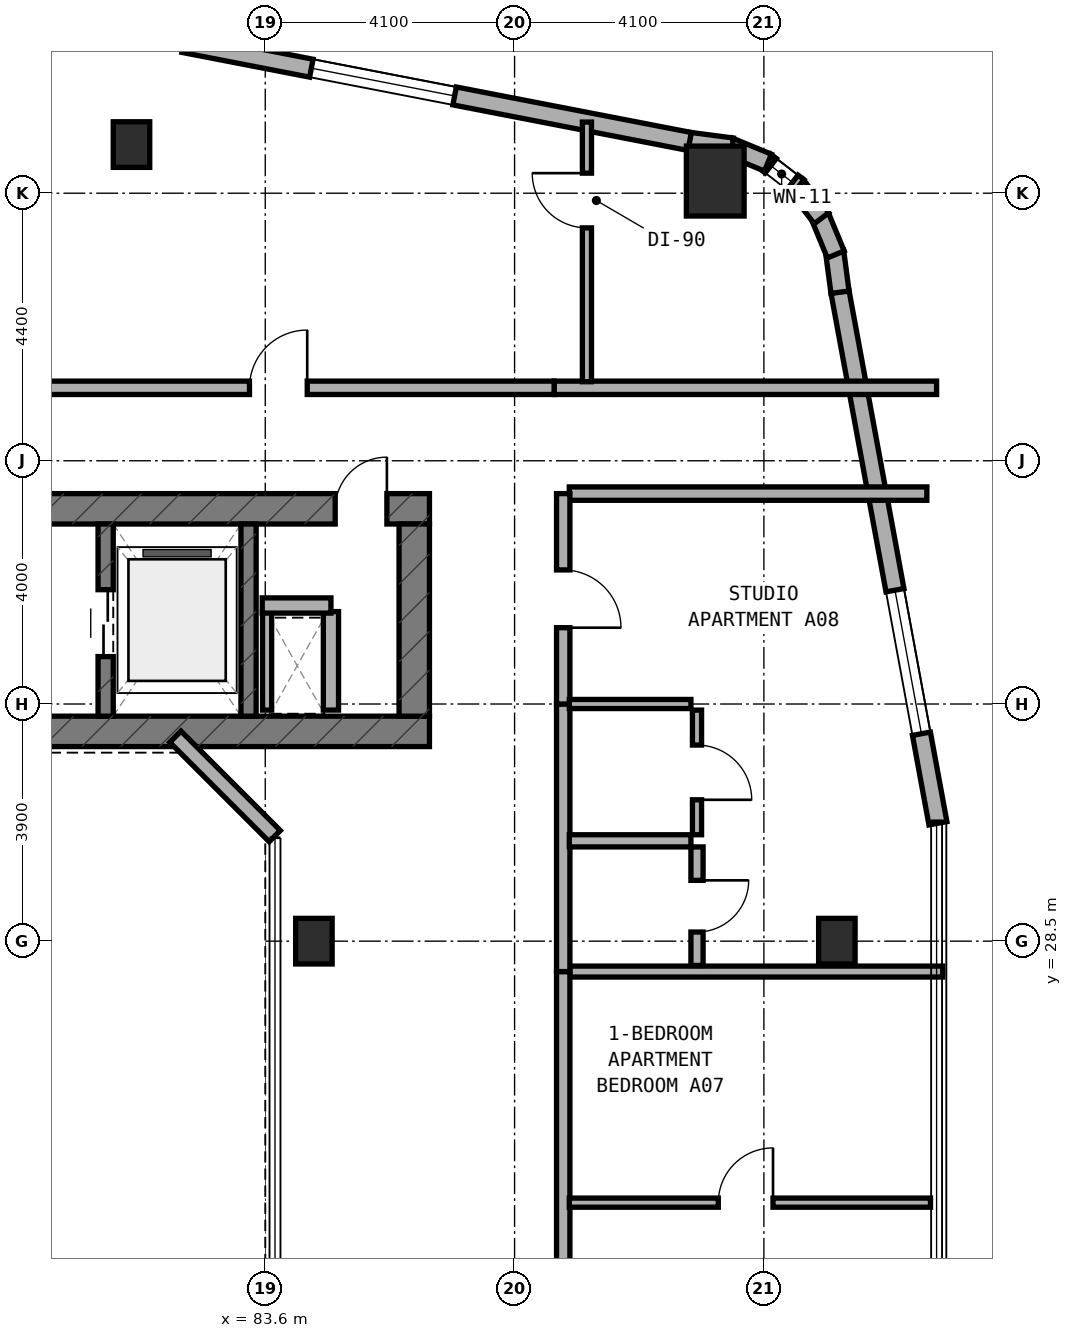
"""IFC4 building model, lengths in metres.
Left out: names, types, materials, properties, quantities, classifications, styles, units other than length and angle.
Written with IfcOpenShell. Run it as: python <this file> out.ifc"""

import sys

from ifc_helpers import new_model, si_unit, direction, frame, frame_2d, origin, origin_2d, place, context, subcontext, project, spatial, rectangle, extrude, element, fill, save


model = new_model("IFC4")
c1 = context("Model", 3, precision=1e-05, world=origin(), true_north=direction((0.0, 1.0)))
c2 = subcontext(c1, "Body", "Model", "MODEL_VIEW")
j1 = project(units=[si_unit("LENGTHUNIT", "METRE"), si_unit("PLANEANGLEUNIT", "RADIAN")], contexts=[c1])
p1 = place(None, origin())
s1 = spatial("IfcSite", under=j1, at=p1, CompositionType="ELEMENT")
p2 = place(p1, origin())
s2 = spatial("IfcBuilding", under=s1, at=p2, CompositionType="ELEMENT")
p3 = place(p2, frame((0.0, 0.0, 83.5)))
s3 = spatial("IfcBuildingStorey", under=s2, at=p3, CompositionType="ELEMENT", Elevation=83.5)
p4 = place(p3, frame((67.9, 31.95, 0.0), z_axis=(0.0, 0.0, 1.0), x_axis=(1.0, 0.0, 0.0)))
e1 = element("IfcWall", 1, at=p4, inside=s3, PredefinedType="SHEAR", context=c2, shape_type="SweptSolid", body=[
    extrude(rectangle(XDim=18.4, YDim=0.5, at=frame_2d((9.2, 0.0))), origin(), (0.0, 0.0, 1.0), 3.5),
])
p5 = place(p3, frame((67.9, 35.61, 0.0), z_axis=(0.0, 0.0, 1.0), x_axis=(1.0, 0.0, 0.0)))
e2 = element("IfcWall", 2, at=p5, inside=s3, PredefinedType="SHEAR", context=c2, shape_type="SweptSolid", body=[
    extrude(rectangle(XDim=18.4, YDim=0.5, at=frame_2d((9.2, 0.0))), origin(), (0.0, 0.0, 1.0), 3.5),
])
p6 = place(p5, frame((9.25, 0.0, 0.0)))
e3 = element("IfcOpeningElement", 3, at=p6, cuts=e2, PredefinedType="OPENING", context=c2, shape_type="SweptSolid", body=[
    extrude(rectangle(XDim=1.2, YDim=2.15, at=frame_2d((0.6, 1.075))), frame((0.0, 0.26, 0.0), z_axis=(0.0, -1.0, 0.0), x_axis=(1.0, 0.0, 0.0)), (0.0, 0.0, 1.0), 0.52),
])
p7 = place(p5, frame((16.85, 0.0, 0.0)))
e4 = element("IfcOpeningElement", 4, at=p7, cuts=e2, PredefinedType="OPENING", context=c2, shape_type="SweptSolid", body=[
    extrude(rectangle(XDim=0.85, YDim=2.1, at=frame_2d((0.425, 1.05))), frame((0.0, 0.26, 0.0), z_axis=(0.0, -1.0, 0.0), x_axis=(1.0, 0.0, 0.0)), (0.0, 0.0, 1.0), 0.52),
])
p8 = place(p3, frame((86.05, 32.2, 0.0), z_axis=(0.0, 0.0, 1.0), x_axis=(0.0, 1.0, 0.0)))
e5 = element("IfcWall", 5, at=p8, inside=s3, PredefinedType="SHEAR", context=c2, shape_type="SweptSolid", body=[
    extrude(rectangle(XDim=3.16, YDim=0.5, at=frame_2d((1.58, 0.0))), origin(), (0.0, 0.0, 1.0), 3.5),
])
p9 = place(p3, frame((80.975, 32.2, 0.0), z_axis=(0.0, 0.0, 1.0), x_axis=(0.0, 1.0, 0.0)))
e6 = element("IfcWall", 6, at=p9, inside=s3, PredefinedType="STANDARD", context=c2, shape_type="SweptSolid", body=[
    extrude(rectangle(XDim=3.16, YDim=0.25, at=frame_2d((1.58, 0.0))), origin(), (0.0, 0.0, 1.0), 3.25),
])
p10 = place(p9, frame((0.98, 0.0, 0.0)))
e7 = element("IfcOpeningElement", 7, at=p10, cuts=e6, PredefinedType="OPENING", context=c2, shape_type="SweptSolid", body=[
    extrude(rectangle(XDim=1.1, YDim=2.15, at=frame_2d((0.55, 1.075))), frame((0.0, 0.135, 0.0), z_axis=(0.0, -1.0, 0.0), x_axis=(1.0, 0.0, 0.0)), (0.0, 0.0, 1.0), 0.27),
])
p11 = place(p3, frame((83.325, 32.2, 0.0), z_axis=(0.0, 0.0, 1.0), x_axis=(0.0, 1.0, 0.0)))
e8 = element("IfcWall", 8, at=p11, inside=s3, PredefinedType="STANDARD", context=c2, shape_type="SweptSolid", body=[
    extrude(rectangle(XDim=3.16, YDim=0.25, at=frame_2d((1.58, 0.0))), origin(), (0.0, 0.0, 1.0), 3.25),
])
for number, where, z_axis, x_axis in (
    (9, (81.4, 41.6, 0.0), (0.0, 0.0, 1.0), (1.0, 0.0, 0.0)),
    (10, (93.0, 28.5, 0.0), (0.0, 0.0, 1.0), (1.0, 0.0, 0.0)),
):
    element("IfcColumn", number, at=place(p3, frame(where, z_axis=z_axis, x_axis=x_axis)), inside=s3, PredefinedType="COLUMN", context=c2, shape_type="SweptSolid", body=[
        extrude(rectangle(XDim=0.6, YDim=0.75, at=origin_2d()), origin(), (0.0, 0.0, 1.0), 3.5),
    ])
p12 = place(p3, frame((91.0, 41.0, 0.0), z_axis=(0.0, 0.0, 1.0), x_axis=(1.0, 0.0, 0.0)))
e11 = element("IfcColumn", 11, at=p12, inside=s3, PredefinedType="COLUMN", context=c2, shape_type="SweptSolid", body=[
    extrude(rectangle(XDim=0.95, YDim=1.15, at=origin_2d()), origin(), (0.0, 0.0, 1.0), 3.5),
])
p13 = place(p3, frame((84.4, 28.5, 0.0), z_axis=(0.0, 0.0, 1.0), x_axis=(1.0, 0.0, 0.0)))
e12 = element("IfcColumn", 12, at=p13, inside=s3, PredefinedType="COLUMN", context=c2, shape_type="SweptSolid", body=[
    extrude(rectangle(XDim=0.6, YDim=0.75, at=origin_2d()), origin(), (0.0, 0.0, 1.0), 3.5),
])
p14 = place(p3, frame((94.662, 30.439, 0.0), z_axis=(0.0, 0.0, 1.0), x_axis=(-0.181241420611, 0.983438634311, 0.0)))
e13 = element("IfcWall", 13, at=p14, inside=s3, PredefinedType="STANDARD", context=c2, shape_type="SweptSolid", body=[
    extrude(rectangle(XDim=8.889, YDim=0.3, at=frame_2d((4.445, 0.0))), origin(), (0.0, 0.0, 1.0), 3.25),
])
p15 = place(p14, frame((1.497, 0.0, 0.8)))
e14 = element("IfcOpeningElement", 14, at=p15, cuts=e13, PredefinedType="OPENING", context=c2, shape_type="SweptSolid", body=[
    extrude(rectangle(XDim=2.4, YDim=1.6, at=frame_2d((1.2, 0.8))), frame((0.0, 0.16, 0.0), z_axis=(0.0, -1.0, 0.0), x_axis=(1.0, 0.0, 0.0)), (0.0, 0.0, 1.0), 0.32),
])
p16 = place(p3, frame((93.052, 39.172, 0.0), z_axis=(0.0, 0.0, 1.0), x_axis=(-0.131667498923, 0.991293937098, 0.0)))
e15 = element("IfcWall", 15, at=p16, inside=s3, PredefinedType="STANDARD", context=c2, shape_type="SweptSolid", body=[
    extrude(rectangle(XDim=0.677, YDim=0.3, at=frame_2d((0.338, 0.0))), origin(), (0.0, 0.0, 1.0), 3.25),
])
p17 = place(p3, frame((92.982, 39.793, 0.0), z_axis=(0.0, 0.0, 1.0), x_axis=(-0.381864727877, 0.92421822618, 0.0)))
e16 = element("IfcWall", 16, at=p17, inside=s3, PredefinedType="STANDARD", context=c2, shape_type="SweptSolid", body=[
    extrude(rectangle(XDim=0.694, YDim=0.3, at=frame_2d((0.347, 0.0))), origin(), (0.0, 0.0, 1.0), 3.25),
])
p18 = place(p3, frame((92.748, 40.389, 0.0), z_axis=(0.0, 0.0, 1.0), x_axis=(-0.609693758543, 0.792637067512, 0.0)))
e17 = element("IfcWall", 17, at=p18, inside=s3, PredefinedType="STANDARD", context=c2, shape_type="SweptSolid", body=[
    extrude(rectangle(XDim=0.694, YDim=0.3, at=frame_2d((0.347, 0.0))), origin(), (0.0, 0.0, 1.0), 3.25),
])
p19 = place(p3, frame((92.367, 40.904, 0.0), z_axis=(0.0, 0.0, 1.0), x_axis=(-0.792807092876, 0.609472651958, 0.0)))
e18 = element("IfcWall", 18, at=p19, inside=s3, PredefinedType="STANDARD", context=c2, shape_type="SweptSolid", body=[
    extrude(rectangle(XDim=0.694, YDim=0.3, at=frame_2d((0.347, 0.0))), origin(), (0.0, 0.0, 1.0), 3.25),
])
p20 = place(p19, frame((0.122, 0.0, 0.85)))
e19 = element("IfcOpeningElement", 19, at=p20, cuts=e18, PredefinedType="OPENING", context=c2, shape_type="SweptSolid", body=[
    extrude(rectangle(XDim=0.45, YDim=1.5, at=frame_2d((0.225, 0.75))), frame((0.0, 0.16, 0.0), z_axis=(0.0, -1.0, 0.0), x_axis=(1.0, 0.0, 0.0)), (0.0, 0.0, 1.0), 0.32),
])
p21 = place(p3, frame((91.866, 41.303, 0.0), z_axis=(0.0, 0.0, 1.0), x_axis=(-0.924042561464, 0.382289608286, 0.0)))
e20 = element("IfcWall", 20, at=p21, inside=s3, PredefinedType="STANDARD", context=c2, shape_type="SweptSolid", body=[
    extrude(rectangle(XDim=0.694, YDim=0.3, at=frame_2d((0.347, 0.0))), origin(), (0.0, 0.0, 1.0), 3.25),
])
p22 = place(p3, frame((91.278, 41.559, 0.0), z_axis=(0.0, 0.0, 1.0), x_axis=(-0.991433279471, 0.130614135366, 0.0)))
e21 = element("IfcWall", 21, at=p22, inside=s3, PredefinedType="STANDARD", context=c2, shape_type="SweptSolid", body=[
    extrude(rectangle(XDim=0.712, YDim=0.3, at=frame_2d((0.356, 0.0))), origin(), (0.0, 0.0, 1.0), 3.25),
])
p23 = place(p3, frame((90.579, 41.651, 0.0), z_axis=(0.0, 0.0, 1.0), x_axis=(-0.981750199588, 0.190175039396, 0.0)))
e22 = element("IfcWall", 22, at=p23, inside=s3, PredefinedType="STANDARD", context=c2, shape_type="SweptSolid", body=[
    extrude(rectangle(XDim=8.477, YDim=0.3, at=frame_2d((4.238, 0.0))), origin(), (0.0, 0.0, 1.0), 3.25),
])
p24 = place(p23, frame((3.937, 0.0, 0.8)))
e23 = element("IfcOpeningElement", 23, at=p24, cuts=e22, PredefinedType="OPENING", context=c2, shape_type="SweptSolid", body=[
    extrude(rectangle(XDim=2.4, YDim=1.6, at=frame_2d((1.2, 0.8))), frame((0.0, 0.16, 0.0), z_axis=(0.0, -1.0, 0.0), x_axis=(1.0, 0.0, 0.0)), (0.0, 0.0, 1.0), 0.32),
])
p25 = place(p3, frame((83.756, 30.228, 0.0), z_axis=(0.0, 0.0, 1.0), x_axis=(-0.707106781187, 0.707106781187, 0.0)))
e24 = element("IfcWall", 24, at=p25, inside=s3, PredefinedType="STANDARD", context=c2, shape_type="SweptSolid", body=[
    extrude(rectangle(XDim=2.311, YDim=0.26, at=frame_2d((1.155, 0.0))), origin(), (0.0, 0.0, 1.0), 3.25),
])
p26 = place(p3, frame((83.63, 32.3, 0.0), z_axis=(0.0, 0.0, 1.0), x_axis=(0.0, 1.0, 0.0)))
e25 = element("IfcWall", 25, at=p26, inside=s3, PredefinedType="PARTITIONING", context=c2, shape_type="SweptSolid", body=[
    extrude(rectangle(XDim=1.62, YDim=0.15, at=frame_2d((0.81, 0.0))), origin(), (0.0, 0.0, 1.0), 2.825),
])
p27 = place(p3, frame((84.68, 32.3, 0.0), z_axis=(0.0, 0.0, 1.0), x_axis=(0.0, 1.0, 0.0)))
e26 = element("IfcWall", 26, at=p27, inside=s3, PredefinedType="SOLIDWALL", context=c2, shape_type="SweptSolid", body=[
    extrude(rectangle(XDim=1.62, YDim=0.25, at=frame_2d((0.81, 0.0))), origin(), (0.0, 0.0, 1.0), 3.22),
])
p28 = place(p3, frame((83.55, 34.02, 0.0), z_axis=(0.0, 0.0, 1.0), x_axis=(1.0, 0.0, 0.0)))
e27 = element("IfcWall", 27, at=p28, inside=s3, PredefinedType="SOLIDWALL", context=c2, shape_type="SweptSolid", body=[
    extrude(rectangle(XDim=1.13, YDim=0.25, at=frame_2d((0.565, 0.0))), origin(), (0.0, 0.0, 1.0), 3.22),
])
p29 = place(p3, frame((88.35, 37.6, 0.0), z_axis=(0.0, 0.0, 1.0), x_axis=(1.0, 0.0, 0.0)))
e28 = element("IfcWall", 28, at=p29, inside=s3, PredefinedType="SOLIDWALL", context=c2, shape_type="SweptSolid", body=[
    extrude(rectangle(XDim=6.29, YDim=0.22, at=frame_2d((3.145, 0.0))), origin(), (0.0, 0.0, 1.0), 2.945),
])
p30 = place(p3, frame((79.28, 37.6, 0.0), z_axis=(0.0, 0.0, 1.0), x_axis=(1.0, 0.0, 0.0)))
e29 = element("IfcWall", 29, at=p30, inside=s3, PredefinedType="SOLIDWALL", context=c2, shape_type="SweptSolid", body=[
    extrude(rectangle(XDim=9.07, YDim=0.22, at=frame_2d((4.535, 0.0))), origin(), (0.0, 0.0, 1.0), 2.825),
])
p31 = place(p30, frame((4.06, 0.0, 0.0)))
e30 = element("IfcOpeningElement", 30, at=p31, cuts=e29, PredefinedType="OPENING", context=c2, shape_type="SweptSolid", body=[
    extrude(rectangle(XDim=0.95, YDim=2.1, at=frame_2d((0.475, 1.05))), frame((0.0, 0.12, 0.0), z_axis=(0.0, -1.0, 0.0), x_axis=(1.0, 0.0, 0.0)), (0.0, 0.0, 1.0), 0.24),
])
p32 = place(p3, frame((88.89, 37.7, 0.0), z_axis=(0.0, 0.0, 1.0), x_axis=(0.0, 1.0, 0.0)))
e31 = element("IfcWall", 31, at=p32, inside=s3, PredefinedType="PARTITIONING", context=c2, shape_type="SweptSolid", body=[
    extrude(rectangle(XDim=4.27, YDim=0.15, at=frame_2d((2.135, 0.0))), origin(), (0.0, 0.0, 1.0), 2.945),
])
p33 = place(p32, frame((2.53, 0.0, 0.0)))
e32 = element("IfcOpeningElement", 32, at=p33, cuts=e31, PredefinedType="OPENING", context=c2, shape_type="SweptSolid", body=[
    extrude(rectangle(XDim=0.9, YDim=2.1, at=frame_2d((0.45, 1.05))), frame((0.0, 0.085, 0.0), z_axis=(0.0, -1.0, 0.0), x_axis=(1.0, 0.0, 0.0)), (0.0, 0.0, 1.0), 0.17),
])
p34 = place(p3, frame((88.6, 35.86, 0.0), z_axis=(0.0, 0.0, 1.0), x_axis=(1.0, 0.0, 0.0)))
e33 = element("IfcWall", 33, at=p34, inside=s3, PredefinedType="SOLIDWALL", context=c2, shape_type="SweptSolid", body=[
    extrude(rectangle(XDim=5.88, YDim=0.22, at=frame_2d((2.94, 0.0))), origin(), (0.0, 0.0, 1.0), 2.945),
])
p35 = place(p3, frame((88.5, 28.0, 0.0), z_axis=(0.0, 0.0, 1.0), x_axis=(1.0, 0.0, 0.0)))
e34 = element("IfcWall", 34, at=p35, inside=s3, PredefinedType="SOLIDWALL", context=c2, shape_type="SweptSolid", body=[
    extrude(rectangle(XDim=6.24, YDim=0.18, at=frame_2d((3.12, 0.0))), origin(), (0.0, 0.0, 1.0), 2.945),
])
p36 = place(p3, frame((88.5, 18.54, 0.0), z_axis=(0.0, 0.0, 1.0), x_axis=(0.0, 1.0, 0.0)))
e35 = element("IfcWall", 35, at=p36, inside=s3, PredefinedType="SOLIDWALL", context=c2, shape_type="SweptSolid", body=[
    extrude(rectangle(XDim=9.46, YDim=0.22, at=frame_2d((4.73, 0.0))), origin(), (0.0, 0.0, 1.0), 2.825),
])
p37 = place(p36, frame((2.355, 0.0, 0.0)))
e36 = element("IfcOpeningElement", 36, at=p37, cuts=e35, PredefinedType="OPENING", context=c2, shape_type="SweptSolid", body=[
    extrude(rectangle(XDim=0.95, YDim=2.1, at=frame_2d((0.475, 1.05))), frame((0.0, 0.12, 0.0), z_axis=(0.0, -1.0, 0.0), x_axis=(1.0, 0.0, 0.0)), (0.0, 0.0, 1.0), 0.24),
])
p38 = place(p3, frame((88.6, 24.2, 0.0), z_axis=(0.0, 0.0, 1.0), x_axis=(1.0, 0.0, 0.0)))
e37 = element("IfcWall", 37, at=p38, inside=s3, PredefinedType="PARTITIONING", context=c2, shape_type="SweptSolid", body=[
    extrude(rectangle(XDim=5.94, YDim=0.15, at=frame_2d((2.97, 0.0))), origin(), (0.0, 0.0, 1.0), 2.945),
])
p39 = place(p38, frame((2.45, 0.0, 0.0)))
e38 = element("IfcOpeningElement", 38, at=p39, cuts=e37, PredefinedType="OPENING", context=c2, shape_type="SweptSolid", body=[
    extrude(rectangle(XDim=0.9, YDim=2.1, at=frame_2d((0.45, 1.05))), frame((0.0, 0.085, 0.0), z_axis=(0.0, -1.0, 0.0), x_axis=(1.0, 0.0, 0.0)), (0.0, 0.0, 1.0), 0.17),
])
p40 = place(p3, frame((88.5, 28.0, 0.0), z_axis=(0.0, 0.0, 1.0), x_axis=(0.0, 1.0, 0.0)))
e39 = element("IfcWall", 39, at=p40, inside=s3, PredefinedType="SOLIDWALL", context=c2, shape_type="SweptSolid", body=[
    extrude(rectangle(XDim=4.4, YDim=0.22, at=frame_2d((2.2, 0.0))), origin(), (0.0, 0.0, 1.0), 2.825),
])
p41 = place(p3, frame((88.5, 32.4, 0.0), z_axis=(0.0, 0.0, 1.0), x_axis=(0.0, 1.0, 0.0)))
e40 = element("IfcWall", 40, at=p41, inside=s3, PredefinedType="SOLIDWALL", context=c2, shape_type="SweptSolid", body=[
    extrude(rectangle(XDim=3.46, YDim=0.22, at=frame_2d((1.73, 0.0))), origin(), (0.0, 0.0, 1.0), 3.22),
])
p42 = place(p41, frame((1.255, 0.0, 0.0)))
e41 = element("IfcOpeningElement", 41, at=p42, cuts=e40, PredefinedType="OPENING", context=c2, shape_type="SweptSolid", body=[
    extrude(rectangle(XDim=0.95, YDim=2.1, at=frame_2d((0.475, 1.05))), frame((0.0, 0.12, 0.0), z_axis=(0.0, -1.0, 0.0), x_axis=(1.0, 0.0, 0.0)), (0.0, 0.0, 1.0), 0.24),
])
p43 = place(p3, frame((88.6, 30.15, 0.0), z_axis=(0.0, 0.0, 1.0), x_axis=(1.0, 0.0, 0.0)))
e42 = element("IfcWall", 42, at=p43, inside=s3, PredefinedType="PLUMBINGWALL", context=c2, shape_type="SweptSolid", body=[
    extrude(rectangle(XDim=2.0, YDim=0.2, at=frame_2d((1.0, 0.0))), origin(), (0.0, 0.0, 1.0), 3.22),
])
p44 = place(p3, frame((88.6, 32.4, 0.0), z_axis=(0.0, 0.0, 1.0), x_axis=(1.0, 0.0, 0.0)))
e43 = element("IfcWall", 43, at=p44, inside=s3, PredefinedType="PARTITIONING", context=c2, shape_type="SweptSolid", body=[
    extrude(rectangle(XDim=2.0, YDim=0.15, at=frame_2d((1.0, 0.0))), origin(), (0.0, 0.0, 1.0), 3.22),
])
p45 = place(p3, frame((90.7, 28.1, 0.0), z_axis=(0.0, 0.0, 1.0), x_axis=(0.0, 1.0, 0.0)))
e44 = element("IfcWall", 44, at=p45, inside=s3, PredefinedType="PLUMBINGWALL", context=c2, shape_type="SweptSolid", body=[
    extrude(rectangle(XDim=1.95, YDim=0.2, at=frame_2d((0.975, 0.0))), origin(), (0.0, 0.0, 1.0), 2.825),
])
p46 = place(p45, frame((0.55, 0.0, 0.0)))
e45 = element("IfcOpeningElement", 45, at=p46, cuts=e44, PredefinedType="OPENING", context=c2, shape_type="SweptSolid", body=[
    extrude(rectangle(XDim=0.85, YDim=2.1, at=frame_2d((0.425, 1.05))), frame((0.0, 0.11, 0.0), z_axis=(0.0, -1.0, 0.0), x_axis=(1.0, 0.0, 0.0)), (0.0, 0.0, 1.0), 0.22),
])
p47 = place(p3, frame((90.7, 30.25, 0.0), z_axis=(0.0, 0.0, 1.0), x_axis=(0.0, 1.0, 0.0)))
e46 = element("IfcWall", 46, at=p47, inside=s3, PredefinedType="PARTITIONING", context=c2, shape_type="SweptSolid", body=[
    extrude(rectangle(XDim=2.05, YDim=0.15, at=frame_2d((1.025, 0.0))), origin(), (0.0, 0.0, 1.0), 3.22),
])
p48 = place(p47, frame((0.575, 0.0, 0.0)))
e47 = element("IfcOpeningElement", 47, at=p48, cuts=e46, PredefinedType="OPENING", context=c2, shape_type="SweptSolid", body=[
    extrude(rectangle(XDim=0.9, YDim=2.1, at=frame_2d((0.45, 1.05))), frame((0.0, 0.085, 0.0), z_axis=(0.0, -1.0, 0.0), x_axis=(1.0, 0.0, 0.0)), (0.0, 0.0, 1.0), 0.17),
])
p49 = place(p15, origin())
e48 = element("IfcWindow", 48, at=p49, inside=s3, PartitioningType="SINGLE_PANEL", PredefinedType="WINDOW", context=c2, shape_type="SweptSolid", body=[
    extrude(rectangle(XDim=2.4, YDim=1.6, at=frame_2d((1.2, 0.8))), frame((0.0, 0.03, 0.0), z_axis=(0.0, -1.0, 0.0), x_axis=(1.0, 0.0, 0.0)), (0.0, 0.0, 1.0), 0.06),
])
fill(e14, e48)
p50 = place(p24, origin())
e49 = element("IfcWindow", 49, at=p50, inside=s3, PartitioningType="SINGLE_PANEL", PredefinedType="WINDOW", context=c2, shape_type="SweptSolid", body=[
    extrude(rectangle(XDim=2.4, YDim=1.6, at=frame_2d((1.2, 0.8))), frame((0.0, 0.03, 0.0), z_axis=(0.0, -1.0, 0.0), x_axis=(1.0, 0.0, 0.0)), (0.0, 0.0, 1.0), 0.06),
])
fill(e23, e49)
p51 = place(p20, origin())
e50 = element("IfcWindow", 50, at=p51, inside=s3, PartitioningType="SINGLE_PANEL", PredefinedType="WINDOW", context=c2, shape_type="SweptSolid", body=[
    extrude(rectangle(XDim=0.45, YDim=1.5, at=frame_2d((0.225, 0.75))), frame((0.0, 0.03, 0.0), z_axis=(0.0, -1.0, 0.0), x_axis=(1.0, 0.0, 0.0)), (0.0, 0.0, 1.0), 0.06),
])
fill(e19, e50)
p52 = place(p10, origin())
e51 = element("IfcDoor", 51, at=p52, inside=s3, OperationType="DOUBLE_DOOR_SLIDING", PredefinedType="DOOR", context=c2, shape_type="SweptSolid", body=[
    extrude(rectangle(XDim=1.1, YDim=2.15, at=frame_2d((0.55, 1.075))), frame((0.0, 0.025, 0.0), z_axis=(0.0, -1.0, 0.0), x_axis=(1.0, 0.0, 0.0)), (0.0, 0.0, 1.0), 0.05),
])
fill(e7, e51)
p53 = place(p7, origin())
e52 = element("IfcDoor", 52, at=p53, inside=s3, OperationType="SINGLE_SWING_RIGHT", PredefinedType="DOOR", context=c2, shape_type="SweptSolid", body=[
    extrude(rectangle(XDim=0.85, YDim=2.1, at=frame_2d((0.425, 1.05))), frame((0.0, 0.025, 0.0), z_axis=(0.0, -1.0, 0.0), x_axis=(1.0, 0.0, 0.0)), (0.0, 0.0, 1.0), 0.05),
])
fill(e4, e52)
p54 = place(p31, origin())
e53 = element("IfcDoor", 53, at=p54, inside=s3, OperationType="SINGLE_SWING_RIGHT", PredefinedType="DOOR", context=c2, shape_type="SweptSolid", body=[
    extrude(rectangle(XDim=0.95, YDim=2.1, at=frame_2d((0.475, 1.05))), frame((0.0, 0.025, 0.0), z_axis=(0.0, -1.0, 0.0), x_axis=(1.0, 0.0, 0.0)), (0.0, 0.0, 1.0), 0.05),
])
fill(e30, e53)
p55 = place(p33, origin())
e54 = element("IfcDoor", 54, at=p55, inside=s3, OperationType="SINGLE_SWING_RIGHT", PredefinedType="DOOR", context=c2, shape_type="SweptSolid", body=[
    extrude(rectangle(XDim=0.9, YDim=2.1, at=frame_2d((0.45, 1.05))), frame((0.0, 0.025, 0.0), z_axis=(0.0, -1.0, 0.0), x_axis=(1.0, 0.0, 0.0)), (0.0, 0.0, 1.0), 0.05),
])
fill(e32, e54)
p56 = place(p39, origin())
e55 = element("IfcDoor", 55, at=p56, inside=s3, OperationType="SINGLE_SWING_RIGHT", PredefinedType="DOOR", context=c2, shape_type="SweptSolid", body=[
    extrude(rectangle(XDim=0.9, YDim=2.1, at=frame_2d((0.45, 1.05))), frame((0.0, 0.025, 0.0), z_axis=(0.0, -1.0, 0.0), x_axis=(1.0, 0.0, 0.0)), (0.0, 0.0, 1.0), 0.05),
])
fill(e38, e55)
p57 = place(p42, frame((0.95, 0.0, 0.0), z_axis=(0.0, 0.0, 1.0), x_axis=(-1.0, 0.0, 0.0)))
e56 = element("IfcDoor", 56, at=p57, inside=s3, OperationType="SINGLE_SWING_RIGHT", PredefinedType="DOOR", context=c2, shape_type="SweptSolid", body=[
    extrude(rectangle(XDim=0.95, YDim=2.1, at=frame_2d((0.475, 1.05))), frame((0.0, 0.025, 0.0), z_axis=(0.0, -1.0, 0.0), x_axis=(1.0, 0.0, 0.0)), (0.0, 0.0, 1.0), 0.05),
])
fill(e41, e56)
p58 = place(p46, frame((0.85, 0.0, 0.0), z_axis=(0.0, 0.0, 1.0), x_axis=(-1.0, 0.0, 0.0)))
e57 = element("IfcDoor", 57, at=p58, inside=s3, OperationType="SINGLE_SWING_LEFT", PredefinedType="DOOR", context=c2, shape_type="SweptSolid", body=[
    extrude(rectangle(XDim=0.85, YDim=2.1, at=frame_2d((0.425, 1.05))), frame((0.0, 0.025, 0.0), z_axis=(0.0, -1.0, 0.0), x_axis=(1.0, 0.0, 0.0)), (0.0, 0.0, 1.0), 0.05),
])
fill(e45, e57)
p59 = place(p48, frame((0.9, 0.0, 0.0), z_axis=(0.0, 0.0, 1.0), x_axis=(-1.0, 0.0, 0.0)))
e58 = element("IfcDoor", 58, at=p59, inside=s3, OperationType="SINGLE_SWING_RIGHT", PredefinedType="DOOR", context=c2, shape_type="SweptSolid", body=[
    extrude(rectangle(XDim=0.9, YDim=2.1, at=frame_2d((0.45, 1.05))), frame((0.0, 0.025, 0.0), z_axis=(0.0, -1.0, 0.0), x_axis=(1.0, 0.0, 0.0)), (0.0, 0.0, 1.0), 0.05),
])
fill(e47, e58)
save(model, sys.argv[1])
